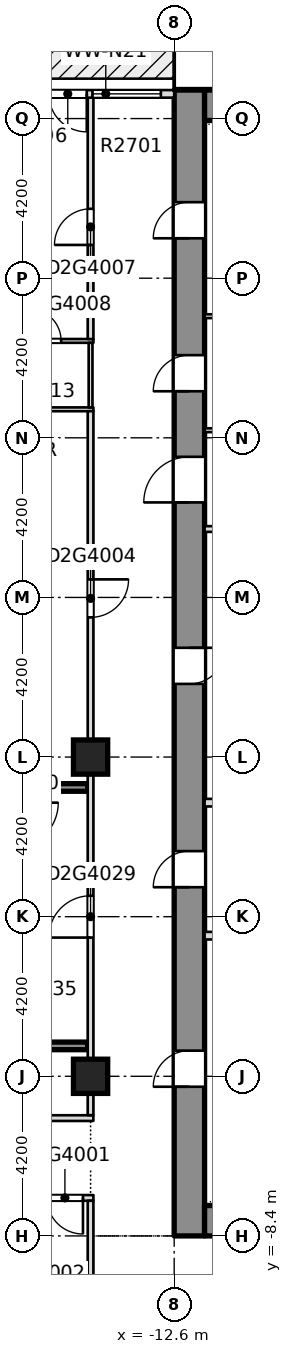
"""IFC4 building model, lengths in metres.
Left out: names, types, materials, properties, quantities, classifications, styles, units other than length and angle.
Written with IfcOpenShell. Run it as: python <this file> out.ifc"""

import sys

from ifc_helpers import new_model, si_unit, direction, frame, frame_2d, origin, origin_2d, place, context, subcontext, project, spatial, rectangle, extrude, element, fill, save


model = new_model("IFC4")
c1 = context("Model", 3, precision=1e-05, world=origin(), true_north=direction((0.0, 1.0)))
c2 = subcontext(c1, "Body", "Model", "MODEL_VIEW")
j1 = project(units=[si_unit("LENGTHUNIT", "METRE"), si_unit("PLANEANGLEUNIT", "RADIAN")], contexts=[c1])
p1 = place(None, origin())
s1 = spatial("IfcSite", under=j1, at=p1, CompositionType="ELEMENT")
p2 = place(p1, origin())
s2 = spatial("IfcBuilding", under=s1, at=p2, CompositionType="ELEMENT")
p3 = place(p2, frame((0.0, 0.0, 108.0)))
s3 = spatial("IfcBuildingStorey", under=s2, at=p3, CompositionType="ELEMENT", Elevation=108.0)
p4 = place(p3, frame((-12.2, -8.4, -0.32), z_axis=(0.0, 0.0, 1.0), x_axis=(0.0, 1.0, 0.0)))
e1 = element("IfcWall", 1, at=p4, inside=s3, PredefinedType="SHEAR", context=c2, shape_type="SweptSolid", body=[
    extrude(rectangle(XDim=30.15, YDim=0.8, at=frame_2d((15.075, 0.0))), origin(), (0.0, 0.0, 1.0), 3.45),
])
p5 = place(p4, frame((3.925, 0.0, 0.32)))
e2 = element("IfcOpeningElement", 2, at=p5, cuts=e1, PredefinedType="OPENING", context=c2, shape_type="SweptSolid", body=[
    extrude(rectangle(XDim=0.95, YDim=2.1, at=frame_2d((0.475, 1.05))), frame((0.0, 0.41, 0.0), z_axis=(0.0, -1.0, 0.0), x_axis=(1.0, 0.0, 0.0)), (0.0, 0.0, 1.0), 0.82),
])
p6 = place(p4, frame((9.175, 0.0, 0.32)))
e3 = element("IfcOpeningElement", 3, at=p6, cuts=e1, PredefinedType="OPENING", context=c2, shape_type="SweptSolid", body=[
    extrude(rectangle(XDim=0.95, YDim=2.1, at=frame_2d((0.475, 1.05))), frame((0.0, 0.41, 0.0), z_axis=(0.0, -1.0, 0.0), x_axis=(1.0, 0.0, 0.0)), (0.0, 0.0, 1.0), 0.82),
])
p7 = place(p4, frame((14.525, 0.0, 0.32)))
e4 = element("IfcOpeningElement", 4, at=p7, cuts=e1, PredefinedType="OPENING", context=c2, shape_type="SweptSolid", body=[
    extrude(rectangle(XDim=0.95, YDim=2.1, at=frame_2d((0.475, 1.05))), frame((0.0, 0.41, 0.0), z_axis=(0.0, -1.0, 0.0), x_axis=(1.0, 0.0, 0.0)), (0.0, 0.0, 1.0), 0.82),
])
p8 = place(p4, frame((22.225, 0.0, 0.32)))
e5 = element("IfcOpeningElement", 5, at=p8, cuts=e1, PredefinedType="OPENING", context=c2, shape_type="SweptSolid", body=[
    extrude(rectangle(XDim=0.95, YDim=2.1, at=frame_2d((0.475, 1.05))), frame((0.0, 0.41, 0.0), z_axis=(0.0, -1.0, 0.0), x_axis=(1.0, 0.0, 0.0)), (0.0, 0.0, 1.0), 0.82),
])
p9 = place(p4, frame((26.25, 0.0, 0.32)))
e6 = element("IfcOpeningElement", 6, at=p9, cuts=e1, PredefinedType="OPENING", context=c2, shape_type="SweptSolid", body=[
    extrude(rectangle(XDim=0.95, YDim=2.1, at=frame_2d((0.475, 1.05))), frame((0.0, 0.41, 0.0), z_axis=(0.0, -1.0, 0.0), x_axis=(1.0, 0.0, 0.0)), (0.0, 0.0, 1.0), 0.82),
])
p10 = place(p4, frame((19.3, 0.0, 0.32)))
e7 = element("IfcOpeningElement", 7, at=p10, cuts=e1, PredefinedType="OPENING", context=c2, shape_type="SweptSolid", body=[
    extrude(rectangle(XDim=1.2, YDim=2.1, at=frame_2d((0.6, 1.05))), frame((0.0, 0.41, 0.0), z_axis=(0.0, -1.0, 0.0), x_axis=(1.0, 0.0, 0.0)), (0.0, 0.0, 1.0), 0.82),
])
p11 = place(p3, frame((-11.8, -8.0, -0.32), z_axis=(0.0, 0.0, 1.0), x_axis=(1.0, 0.0, 0.0)))
e8 = element("IfcWall", 8, at=p11, inside=s3, PredefinedType="SHEAR", context=c2, shape_type="SweptSolid", body=[
    extrude(rectangle(XDim=23.6, YDim=0.8, at=frame_2d((11.8, 0.0))), origin(), (0.0, 0.0, 1.0), 3.45),
])
p12 = place(p11, frame((7.05, 0.0, 0.32)))
e9 = element("IfcOpeningElement", 9, at=p12, cuts=e8, PredefinedType="OPENING", context=c2, shape_type="SweptSolid", body=[
    extrude(rectangle(XDim=1.8, YDim=2.1, at=frame_2d((0.9, 1.05))), frame((0.0, 0.41, 0.0), z_axis=(0.0, -1.0, 0.0), x_axis=(1.0, 0.0, 0.0)), (0.0, 0.0, 1.0), 0.82),
])
p13 = place(p11, frame((14.75, 0.0, 0.32)))
e10 = element("IfcOpeningElement", 10, at=p13, cuts=e8, PredefinedType="OPENING", context=c2, shape_type="SweptSolid", body=[
    extrude(rectangle(XDim=1.8, YDim=2.1, at=frame_2d((0.9, 1.05))), frame((0.0, 0.41, 0.0), z_axis=(0.0, -1.0, 0.0), x_axis=(1.0, 0.0, 0.0)), (0.0, 0.0, 1.0), 0.82),
])
p14 = place(p3, frame((-11.8, 21.35, -0.32), z_axis=(0.0, 0.0, 1.0), x_axis=(1.0, 0.0, 0.0)))
e11 = element("IfcWall", 11, at=p14, inside=s3, PredefinedType="SHEAR", context=c2, shape_type="SweptSolid", body=[
    extrude(rectangle(XDim=23.6, YDim=0.8, at=frame_2d((11.8, 0.0))), origin(), (0.0, 0.0, 1.0), 3.45),
])
for number, where, z_axis, x_axis in (
    (12, (-14.8, -4.2, -0.32), (0.0, 0.0, 1.0), (1.0, 0.0, 0.0)),
    (13, (-14.8, 4.2, -0.32), (0.0, 0.0, 1.0), (1.0, 0.0, 0.0)),
):
    element("IfcColumn", number, at=place(p3, frame(where, z_axis=z_axis, x_axis=x_axis)), inside=s3, PredefinedType="COLUMN", context=c2, shape_type="SweptSolid", body=[
        extrude(rectangle(XDim=0.9, YDim=0.9, at=origin_2d()), origin(), (0.0, 0.0, 1.0), 3.45),
    ])
p15 = place(p3, frame((-25.75, -7.4, 0.0), z_axis=(0.0, 0.0, 1.0), x_axis=(1.0, 0.0, 0.0)))
e14 = element("IfcWall", 14, at=p15, inside=s3, PredefinedType="PARTITIONING", context=c2, shape_type="SweptSolid", body=[
    extrude(rectangle(XDim=11.025, YDim=0.15, at=frame_2d((5.512, 0.0))), origin(), (0.0, 0.0, 1.0), 3.13),
])
p16 = place(p15, frame((9.8, 0.0, 0.0)))
e15 = element("IfcOpeningElement", 15, at=p16, cuts=e14, PredefinedType="OPENING", context=c2, shape_type="SweptSolid", body=[
    extrude(rectangle(XDim=0.95, YDim=2.1, at=frame_2d((0.475, 1.05))), frame((0.0, 0.085, 0.0), z_axis=(0.0, -1.0, 0.0), x_axis=(1.0, 0.0, 0.0)), (0.0, 0.0, 1.0), 0.17),
])
p17 = place(p3, frame((-25.75, -5.3, 0.0), z_axis=(0.0, 0.0, 1.0), x_axis=(1.0, 0.0, 0.0)))
e16 = element("IfcWall", 16, at=p17, inside=s3, PredefinedType="PARTITIONING", context=c2, shape_type="SweptSolid", body=[
    extrude(rectangle(XDim=11.023, YDim=0.15, at=frame_2d((5.511, 0.0))), origin(), (0.0, 0.0, 1.0), 3.13),
])
p18 = place(p3, frame((-20.4, -3.4, 0.0), z_axis=(0.0, 0.0, 1.0), x_axis=(1.0, 0.0, 0.0)))
e17 = element("IfcWall", 17, at=p18, inside=s3, PredefinedType="SOLIDWALL", context=c2, shape_type="SweptSolid", body=[
    extrude(rectangle(XDim=5.523, YDim=0.2, at=frame_2d((2.761, 0.0))), origin(), (0.0, 0.0, 1.0), 3.13),
])
p19 = place(p3, frame((-20.45, 3.4, 0.0), z_axis=(0.0, 0.0, 1.0), x_axis=(1.0, 0.0, 0.0)))
e18 = element("IfcWall", 18, at=p19, inside=s3, PredefinedType="SOLIDWALL", context=c2, shape_type="SweptSolid", body=[
    extrude(rectangle(XDim=5.575, YDim=0.2, at=frame_2d((2.788, 0.0))), origin(), (0.0, 0.0, 1.0), 3.13),
])
p20 = place(p3, frame((-17.25, 13.35, 0.0), z_axis=(0.0, 0.0, 1.0), x_axis=(1.0, 0.0, 0.0)))
e19 = element("IfcWall", 19, at=p20, inside=s3, PredefinedType="PARTITIONING", context=c2, shape_type="SweptSolid", body=[
    extrude(rectangle(XDim=2.525, YDim=0.1, at=frame_2d((1.262, 0.0))), origin(), (0.0, 0.0, 1.0), 3.13),
])
p21 = place(p3, frame((-17.25, 15.15, 0.0), z_axis=(0.0, 0.0, 1.0), x_axis=(1.0, 0.0, 0.0)))
e20 = element("IfcWall", 20, at=p21, inside=s3, PredefinedType="PARTITIONING", context=c2, shape_type="SweptSolid", body=[
    extrude(rectangle(XDim=2.525, YDim=0.1, at=frame_2d((1.262, 0.0))), origin(), (0.0, 0.0, 1.0), 3.13),
])
p22 = place(p21, frame((0.825, 0.0, 0.0)))
e21 = element("IfcOpeningElement", 21, at=p22, cuts=e20, PredefinedType="OPENING", context=c2, shape_type="SweptSolid", body=[
    extrude(rectangle(XDim=0.85, YDim=2.1, at=frame_2d((0.425, 1.05))), frame((0.0, 0.06, 0.0), z_axis=(0.0, -1.0, 0.0), x_axis=(1.0, 0.0, 0.0)), (0.0, 0.0, 1.0), 0.12),
])
p23 = place(p3, frame((-14.8, -10.46, 0.0), z_axis=(0.0, 0.0, 1.0), x_axis=(0.0, 1.0, 0.0)))
e22 = element("IfcWall", 22, at=p23, inside=s3, PredefinedType="PARTITIONING", context=c2, shape_type="SweptSolid", body=[
    extrude(rectangle(XDim=2.985, YDim=0.15, at=frame_2d((1.492, 0.0))), origin(), (0.0, 0.0, 1.0), 3.13),
])
p24 = place(p3, frame((-14.8, -5.223, 0.0), z_axis=(0.0, 0.0, 1.0), x_axis=(0.0, 1.0, 0.0)))
e23 = element("IfcWall", 23, at=p24, inside=s3, PredefinedType="PARTITIONING", context=c2, shape_type="SweptSolid", body=[
    extrude(rectangle(XDim=18.523, YDim=0.15, at=frame_2d((9.261, 0.0))), origin(), (0.0, 0.0, 1.0), 3.13),
])
p25 = place(p24, frame((13.098, 0.0, 0.0)))
e24 = element("IfcOpeningElement", 24, at=p25, cuts=e23, PredefinedType="OPENING", context=c2, shape_type="SweptSolid", body=[
    extrude(rectangle(XDim=1.0, YDim=2.1, at=frame_2d((0.5, 1.05))), frame((0.0, 0.085, 0.0), z_axis=(0.0, -1.0, 0.0), x_axis=(1.0, 0.0, 0.0)), (0.0, 0.0, 1.0), 0.17),
])
p26 = place(p24, frame((4.673, 0.0, 0.0)))
e25 = element("IfcOpeningElement", 25, at=p26, cuts=e23, PredefinedType="OPENING", context=c2, shape_type="SweptSolid", body=[
    extrude(rectangle(XDim=1.1, YDim=2.1, at=frame_2d((0.55, 1.05))), frame((0.0, 0.085, 0.0), z_axis=(0.0, -1.0, 0.0), x_axis=(1.0, 0.0, 0.0)), (0.0, 0.0, 1.0), 0.17),
])
p27 = place(p3, frame((-14.8, 13.4, 0.0), z_axis=(0.0, 0.0, 1.0), x_axis=(0.0, 1.0, 0.0)))
e26 = element("IfcWall", 26, at=p27, inside=s3, PredefinedType="PARTITIONING", context=c2, shape_type="SweptSolid", body=[
    extrude(rectangle(XDim=1.7, YDim=0.1, at=frame_2d((0.85, 0.0))), origin(), (0.0, 0.0, 1.0), 3.13),
])
p28 = place(p3, frame((-14.8, 15.2, 0.0), z_axis=(0.0, 0.0, 1.0), x_axis=(0.0, 1.0, 0.0)))
e27 = element("IfcWall", 27, at=p28, inside=s3, PredefinedType="PARTITIONING", context=c2, shape_type="SweptSolid", body=[
    extrude(rectangle(XDim=6.35, YDim=0.15, at=frame_2d((3.175, 0.0))), origin(), (0.0, 0.0, 1.0), 3.13),
])
p29 = place(p28, frame((2.475, 0.0, 0.0)))
e28 = element("IfcOpeningElement", 28, at=p29, cuts=e27, PredefinedType="OPENING", context=c2, shape_type="SweptSolid", body=[
    extrude(rectangle(XDim=0.95, YDim=2.1, at=frame_2d((0.475, 1.05))), frame((0.0, 0.085, 0.0), z_axis=(0.0, -1.0, 0.0), x_axis=(1.0, 0.0, 0.0)), (0.0, 0.0, 1.0), 0.17),
])
p30 = place(p3, frame((-12.6, 21.65, 0.0), z_axis=(0.0, 0.0, 1.0), x_axis=(-1.0, 0.0, 0.0)))
e29 = element("IfcWall", 29, at=p30, inside=s3, PredefinedType="STANDARD", context=c2, shape_type="SweptSolid", body=[
    extrude(rectangle(XDim=3.6, YDim=0.2, at=frame_2d((1.8, 0.0))), origin(), (0.0, 0.0, 1.0), 3.13),
])
p31 = place(p30, frame((0.35, 0.0, 0.2)))
e30 = element("IfcOpeningElement", 30, at=p31, cuts=e29, PredefinedType="OPENING", context=c2, shape_type="SweptSolid", body=[
    extrude(rectangle(XDim=1.8, YDim=2.65, at=frame_2d((0.9, 1.325))), frame((0.0, 0.11, 0.0), z_axis=(0.0, -1.0, 0.0), x_axis=(1.0, 0.0, 0.0)), (0.0, 0.0, 1.0), 0.22),
])
p32 = place(p30, frame((2.3, 0.0, 0.0)))
e31 = element("IfcOpeningElement", 31, at=p32, cuts=e29, PredefinedType="OPENING", context=c2, shape_type="SweptSolid", body=[
    extrude(rectangle(XDim=1.0, YDim=2.4, at=frame_2d((0.5, 1.2))), frame((0.0, 0.11, 0.0), z_axis=(0.0, -1.0, 0.0), x_axis=(1.0, 0.0, 0.0)), (0.0, 0.0, 1.0), 0.22),
])
for number, where, z_axis, x_axis in (
    (32, (-11.799, -0.5, 0.0), (0.0, 0.0, 1.0), (1.0, 0.0, 0.0)),
    (33, (-11.799, 3.0, 0.0), (0.0, 0.0, 1.0), (1.0, 0.0, 0.0)),
):
    element("IfcWall", number, at=place(p3, frame(where, z_axis=z_axis, x_axis=x_axis)), inside=s3, PredefinedType="PARTITIONING", context=c2, shape_type="SweptSolid", body=[
        extrude(rectangle(XDim=2.998, YDim=0.2, at=frame_2d((1.499, 0.0))), origin(), (0.0, 0.0, 1.0), 3.13),
    ])
p33 = place(p3, frame((-11.799, 10.2, 0.0), z_axis=(0.0, 0.0, 1.0), x_axis=(1.0, 0.0, 0.0)))
e34 = element("IfcWall", 34, at=p33, inside=s3, PredefinedType="PARTITIONING", context=c2, shape_type="SweptSolid", body=[
    extrude(rectangle(XDim=2.998, YDim=0.15, at=frame_2d((1.499, 0.0))), origin(), (0.0, 0.0, 1.0), 3.13),
])
for number, where, z_axis, x_axis in (
    (35, (-11.799, 12.8, 0.0), (0.0, 0.0, 1.0), (1.0, 0.0, 0.0)),
    (36, (-11.799, 15.8, 0.0), (0.0, 0.0, 1.0), (1.0, 0.0, 0.0)),
):
    element("IfcWall", number, at=place(p3, frame(where, z_axis=z_axis, x_axis=x_axis)), inside=s3, PredefinedType="PARTITIONING", context=c2, shape_type="SweptSolid", body=[
        extrude(rectangle(XDim=2.998, YDim=0.1, at=frame_2d((1.499, 0.0))), origin(), (0.0, 0.0, 1.0), 3.13),
    ])
p34 = place(p16, origin())
e37 = element("IfcDoor", 37, at=p34, inside=s3, OperationType="SINGLE_SWING_RIGHT", PredefinedType="DOOR", context=c2, shape_type="SweptSolid", body=[
    extrude(rectangle(XDim=0.95, YDim=2.1, at=frame_2d((0.475, 1.05))), frame((0.0, 0.025, 0.0), z_axis=(0.0, -1.0, 0.0), x_axis=(1.0, 0.0, 0.0)), (0.0, 0.0, 1.0), 0.05),
])
fill(e15, e37)
p35 = place(p25, origin())
e38 = element("IfcDoor", 38, at=p35, inside=s3, OperationType="SINGLE_SWING_LEFT", PredefinedType="DOOR", context=c2, shape_type="SweptSolid", body=[
    extrude(rectangle(XDim=1.0, YDim=2.1, at=frame_2d((0.5, 1.05))), frame((0.0, 0.025, 0.0), z_axis=(0.0, -1.0, 0.0), x_axis=(1.0, 0.0, 0.0)), (0.0, 0.0, 1.0), 0.05),
])
fill(e24, e38)
p36 = place(p29, origin())
e39 = element("IfcDoor", 39, at=p36, inside=s3, OperationType="SINGLE_SWING_RIGHT", PredefinedType="DOOR", context=c2, shape_type="SweptSolid", body=[
    extrude(rectangle(XDim=0.95, YDim=2.1, at=frame_2d((0.475, 1.05))), frame((0.0, 0.025, 0.0), z_axis=(0.0, -1.0, 0.0), x_axis=(1.0, 0.0, 0.0)), (0.0, 0.0, 1.0), 0.05),
])
fill(e28, e39)
p37 = place(p22, origin())
e40 = element("IfcDoor", 40, at=p37, inside=s3, OperationType="SINGLE_SWING_RIGHT", PredefinedType="DOOR", context=c2, shape_type="SweptSolid", body=[
    extrude(rectangle(XDim=0.85, YDim=2.1, at=frame_2d((0.425, 1.05))), frame((0.0, 0.025, 0.0), z_axis=(0.0, -1.0, 0.0), x_axis=(1.0, 0.0, 0.0)), (0.0, 0.0, 1.0), 0.05),
])
fill(e21, e40)
p38 = place(p26, origin())
e41 = element("IfcDoor", 41, at=p38, inside=s3, OperationType="SINGLE_SWING_LEFT", PredefinedType="DOOR", context=c2, shape_type="SweptSolid", body=[
    extrude(rectangle(XDim=1.1, YDim=2.1, at=frame_2d((0.55, 1.05))), frame((0.0, 0.025, 0.0), z_axis=(0.0, -1.0, 0.0), x_axis=(1.0, 0.0, 0.0)), (0.0, 0.0, 1.0), 0.05),
])
fill(e25, e41)
p39 = place(p31, origin())
e42 = element("IfcWindow", 42, at=p39, inside=s3, PartitioningType="SINGLE_PANEL", PredefinedType="WINDOW", context=c2, shape_type="SweptSolid", body=[
    extrude(rectangle(XDim=1.8, YDim=2.65, at=frame_2d((0.9, 1.325))), frame((0.0, 0.03, 0.0), z_axis=(0.0, -1.0, 0.0), x_axis=(1.0, 0.0, 0.0)), (0.0, 0.0, 1.0), 0.06),
])
fill(e30, e42)
p40 = place(p32, origin())
e43 = element("IfcDoor", 43, at=p40, inside=s3, OperationType="SINGLE_SWING_LEFT", PredefinedType="DOOR", context=c2, shape_type="SweptSolid", body=[
    extrude(rectangle(XDim=1.0, YDim=2.4, at=frame_2d((0.5, 1.2))), frame((0.0, 0.025, 0.0), z_axis=(0.0, -1.0, 0.0), x_axis=(1.0, 0.0, 0.0)), (0.0, 0.0, 1.0), 0.05),
])
fill(e31, e43)
p41 = place(p5, origin())
e44 = element("IfcDoor", 44, at=p41, inside=s3, OperationType="SINGLE_SWING_LEFT", PredefinedType="DOOR", context=c2, shape_type="SweptSolid", body=[
    extrude(rectangle(XDim=0.95, YDim=2.1, at=frame_2d((0.475, 1.05))), frame((0.0, 0.025, 0.0), z_axis=(0.0, -1.0, 0.0), x_axis=(1.0, 0.0, 0.0)), (0.0, 0.0, 1.0), 0.05),
])
fill(e2, e44)
p42 = place(p6, origin())
e45 = element("IfcDoor", 45, at=p42, inside=s3, OperationType="SINGLE_SWING_LEFT", PredefinedType="DOOR", context=c2, shape_type="SweptSolid", body=[
    extrude(rectangle(XDim=0.95, YDim=2.1, at=frame_2d((0.475, 1.05))), frame((0.0, 0.025, 0.0), z_axis=(0.0, -1.0, 0.0), x_axis=(1.0, 0.0, 0.0)), (0.0, 0.0, 1.0), 0.05),
])
fill(e3, e45)
p43 = place(p7, origin())
e46 = element("IfcDoor", 46, at=p43, inside=s3, OperationType="SINGLE_SWING_LEFT", PredefinedType="DOOR", context=c2, shape_type="SweptSolid", body=[
    extrude(rectangle(XDim=0.95, YDim=2.1, at=frame_2d((0.475, 1.05))), frame((0.0, 0.025, 0.0), z_axis=(0.0, -1.0, 0.0), x_axis=(1.0, 0.0, 0.0)), (0.0, 0.0, 1.0), 0.05),
])
fill(e4, e46)
p44 = place(p8, origin())
e47 = element("IfcDoor", 47, at=p44, inside=s3, OperationType="SINGLE_SWING_LEFT", PredefinedType="DOOR", context=c2, shape_type="SweptSolid", body=[
    extrude(rectangle(XDim=0.95, YDim=2.1, at=frame_2d((0.475, 1.05))), frame((0.0, 0.025, 0.0), z_axis=(0.0, -1.0, 0.0), x_axis=(1.0, 0.0, 0.0)), (0.0, 0.0, 1.0), 0.05),
])
fill(e5, e47)
p45 = place(p9, origin())
e48 = element("IfcDoor", 48, at=p45, inside=s3, OperationType="SINGLE_SWING_LEFT", PredefinedType="DOOR", context=c2, shape_type="SweptSolid", body=[
    extrude(rectangle(XDim=0.95, YDim=2.1, at=frame_2d((0.475, 1.05))), frame((0.0, 0.025, 0.0), z_axis=(0.0, -1.0, 0.0), x_axis=(1.0, 0.0, 0.0)), (0.0, 0.0, 1.0), 0.05),
])
fill(e6, e48)
p46 = place(p10, origin())
e49 = element("IfcDoor", 49, at=p46, inside=s3, OperationType="SINGLE_SWING_LEFT", PredefinedType="DOOR", context=c2, shape_type="SweptSolid", body=[
    extrude(rectangle(XDim=1.2, YDim=2.1, at=frame_2d((0.6, 1.05))), frame((0.0, 0.025, 0.0), z_axis=(0.0, -1.0, 0.0), x_axis=(1.0, 0.0, 0.0)), (0.0, 0.0, 1.0), 0.05),
])
fill(e7, e49)
save(model, sys.argv[1])
